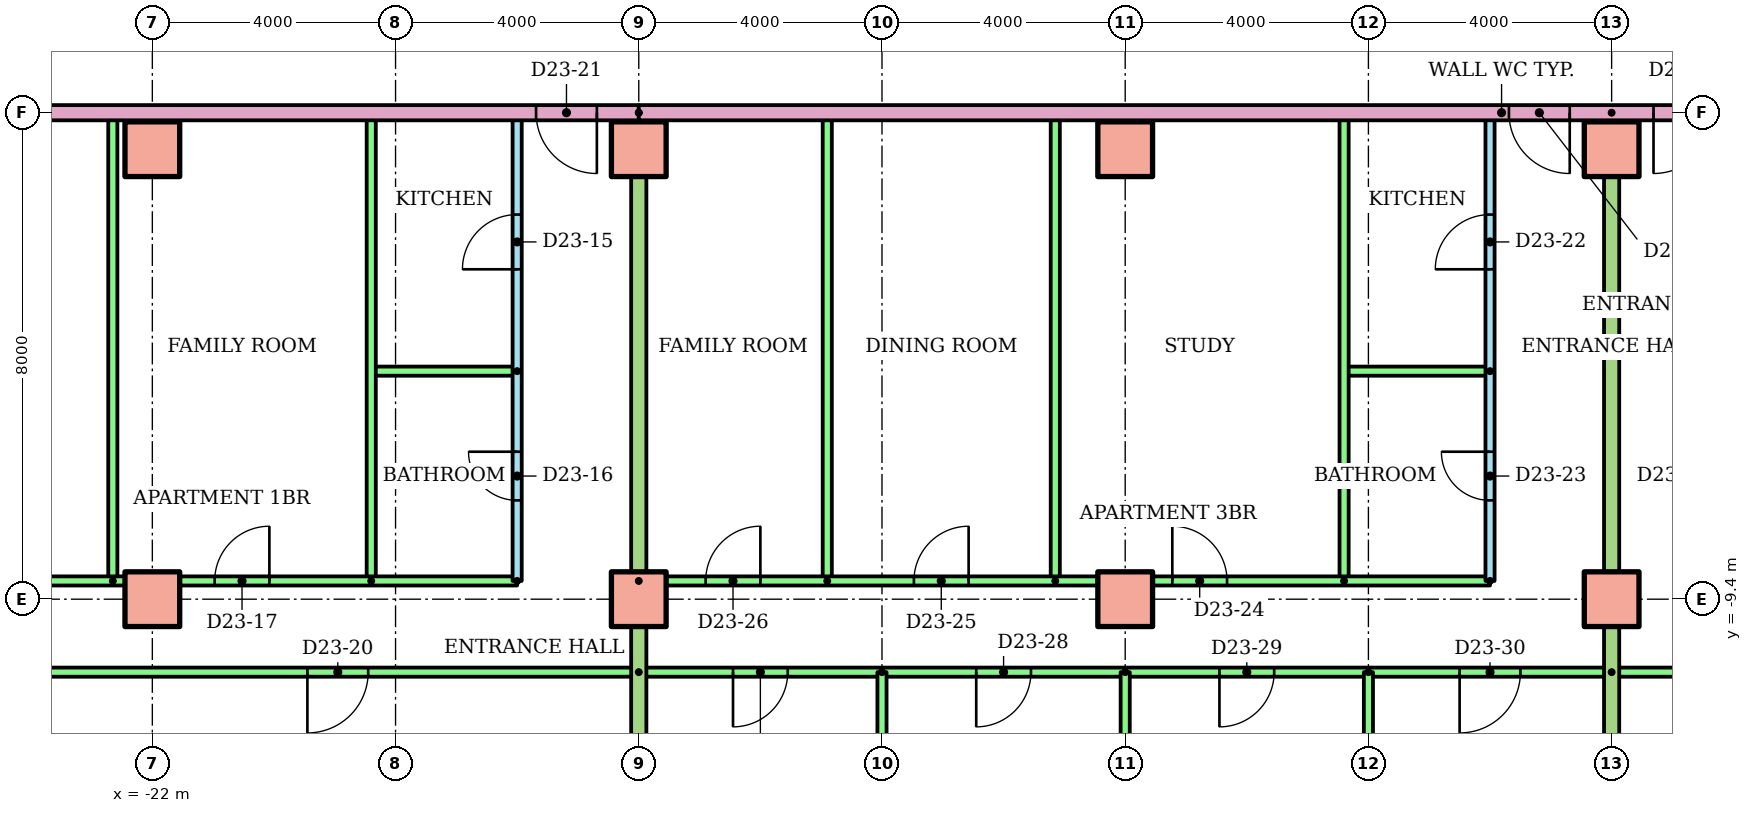
"""IFC4 building model, lengths in metres.
Left out: names, types, materials, properties, quantities, classifications, styles, units other than length and angle.
Written with IfcOpenShell. Run it as: python <this file> out.ifc"""

import sys

from ifc_helpers import new_model, si_unit, direction, frame, frame_2d, origin, origin_2d, place, context, subcontext, project, spatial, rectangle, extrude, element, fill, save


model = new_model("IFC4")
c1 = context("Model", 3, precision=1e-05, world=origin(), true_north=direction((0.0, 1.0)))
c2 = subcontext(c1, "Body", "Model", "MODEL_VIEW")
j1 = project(units=[si_unit("LENGTHUNIT", "METRE"), si_unit("PLANEANGLEUNIT", "RADIAN")], contexts=[c1])
p1 = place(None, origin())
s1 = spatial("IfcSite", under=j1, at=p1, CompositionType="ELEMENT")
p2 = place(p1, origin())
s2 = spatial("IfcBuilding", under=s1, at=p2, CompositionType="ELEMENT")
p3 = place(p2, frame((0.0, 0.0, 90.3)))
s3 = spatial("IfcBuildingStorey", under=s2, at=p3, CompositionType="ELEMENT", Elevation=90.3)
for number, where in (
    (1, (-22.0, -9.4, 0.0)),
    (2, (-14.0, -9.4, 0.0)),
    (3, (-6.0, -9.4, 0.0)),
    (4, (2.0, -9.4, 0.0)),
    (5, (-22.0, -2.0, 0.0)),
    (6, (-14.0, -2.0, 0.0)),
    (7, (-6.0, -2.0, 0.0)),
    (8, (2.0, -2.0, 0.0)),
):
    element("IfcColumn", number, at=place(p3, frame(where)), inside=s3, PredefinedType="COLUMN", context=c2, shape_type="SweptSolid", body=[
        extrude(rectangle(XDim=0.9, YDim=0.9, at=origin_2d()), origin(), (0.0, 0.0, 1.0), 3.2),
    ])
p4 = place(p3, frame((-16.0, -9.1, 0.0), z_axis=(0.0, 0.0, 1.0), x_axis=(0.0, 1.0, 0.0)))
e9 = element("IfcWall", 9, at=p4, inside=s3, PredefinedType="PARTITIONING", context=c2, shape_type="SweptSolid", body=[
    extrude(rectangle(XDim=7.7, YDim=0.15, at=frame_2d((3.85, 0.0))), origin(), (0.0, 0.0, 1.0), 2.4),
])
p5 = place(p4, frame((5.125, 0.0, 0.0)))
e10 = element("IfcOpeningElement", 10, at=p5, cuts=e9, PredefinedType="OPENING", context=c2, shape_type="SweptSolid", body=[
    extrude(rectangle(XDim=0.9, YDim=2.1, at=frame_2d((0.45, 1.05))), frame((0.0, 0.085, 0.0), z_axis=(0.0, -1.0, 0.0), x_axis=(1.0, 0.0, 0.0)), (0.0, 0.0, 1.0), 0.17),
])
p6 = place(p4, frame((1.325, 0.0, 0.0)))
e11 = element("IfcOpeningElement", 11, at=p6, cuts=e9, PredefinedType="OPENING", context=c2, shape_type="SweptSolid", body=[
    extrude(rectangle(XDim=0.8, YDim=2.1, at=frame_2d((0.4, 1.05))), frame((0.0, 0.085, 0.0), z_axis=(0.0, -1.0, 0.0), x_axis=(1.0, 0.0, 0.0)), (0.0, 0.0, 1.0), 0.17),
])
p7 = place(p3, frame((-16.0, -5.65, 0.0), z_axis=(0.0, 0.0, 1.0), x_axis=(-1.0, 0.0, 0.0)))
e12 = element("IfcWall", 12, at=p7, inside=s3, PredefinedType="PARTITIONING", context=c2, shape_type="SweptSolid", body=[
    extrude(rectangle(XDim=2.4, YDim=0.15, at=frame_2d((1.2, 0.0))), origin(), (0.0, 0.0, 1.0), 2.4),
])
for number, where, z_axis, x_axis in (
    (13, (-18.4, -9.1, 0.0), (0.0, 0.0, 1.0), (0.0, 1.0, 0.0)),
    (14, (-22.65, -9.1, 0.0), (0.0, 0.0, 1.0), (0.0, 1.0, 0.0)),
):
    element("IfcWall", number, at=place(p3, frame(where, z_axis=z_axis, x_axis=x_axis)), inside=s3, PredefinedType="PARTITIONING", context=c2, shape_type="SweptSolid", body=[
        extrude(rectangle(XDim=7.7, YDim=0.15, at=frame_2d((3.85, 0.0))), origin(), (0.0, 0.0, 1.0), 2.4),
    ])
p8 = place(p3, frame((-28.61, -9.1, 0.0)))
e15 = element("IfcWall", 15, at=p8, inside=s3, PredefinedType="PARTITIONING", context=c2, shape_type="SweptSolid", body=[
    extrude(rectangle(XDim=12.61, YDim=0.15, at=frame_2d((6.305, 0.0))), origin(), (0.0, 0.0, 1.0), 2.4),
])
p9 = place(p8, frame((7.635, 0.0, 0.0)))
e16 = element("IfcOpeningElement", 16, at=p9, cuts=e15, PredefinedType="OPENING", context=c2, shape_type="SweptSolid", body=[
    extrude(rectangle(XDim=0.9, YDim=2.1, at=frame_2d((0.45, 1.05))), frame((0.0, 0.085, 0.0), z_axis=(0.0, -1.0, 0.0), x_axis=(1.0, 0.0, 0.0)), (0.0, 0.0, 1.0), 0.17),
])
p10 = place(p8, frame((2.635, 0.0, 0.0)))
e17 = element("IfcOpeningElement", 17, at=p10, cuts=e15, PredefinedType="OPENING", context=c2, shape_type="SweptSolid", body=[
    extrude(rectangle(XDim=0.9, YDim=2.1, at=frame_2d((0.45, 1.05))), frame((0.0, 0.085, 0.0), z_axis=(0.0, -1.0, 0.0), x_axis=(1.0, 0.0, 0.0)), (0.0, 0.0, 1.0), 0.17),
])
p11 = place(p3, frame((-14.0, -10.6, 0.0), z_axis=(0.0, 0.0, 1.0), x_axis=(-1.0, 0.0, 0.0)))
e18 = element("IfcWall", 18, at=p11, inside=s3, PredefinedType="PARTITIONING", context=c2, shape_type="SweptSolid", body=[
    extrude(rectangle(XDim=14.62, YDim=0.15, at=frame_2d((7.31, 0.0))), origin(), (0.0, 0.0, 1.0), 2.4),
])
p12 = place(p11, frame((11.7, 0.0, 0.0)))
e19 = element("IfcOpeningElement", 19, at=p12, cuts=e18, PredefinedType="OPENING", context=c2, shape_type="SweptSolid", body=[
    extrude(rectangle(XDim=0.9, YDim=2.1, at=frame_2d((0.45, 1.05))), frame((0.0, 0.085, 0.0), z_axis=(0.0, -1.0, 0.0), x_axis=(1.0, 0.0, 0.0)), (0.0, 0.0, 1.0), 0.17),
])
p13 = place(p11, frame((4.45, 0.0, 0.0)))
e20 = element("IfcOpeningElement", 20, at=p13, cuts=e18, PredefinedType="OPENING", context=c2, shape_type="SweptSolid", body=[
    extrude(rectangle(XDim=1.0, YDim=2.1, at=frame_2d((0.5, 1.05))), frame((0.0, 0.085, 0.0), z_axis=(0.0, -1.0, 0.0), x_axis=(1.0, 0.0, 0.0)), (0.0, 0.0, 1.0), 0.17),
])
p14 = place(p3, frame((0.0, -9.1, 0.0), z_axis=(0.0, 0.0, 1.0), x_axis=(0.0, 1.0, 0.0)))
e21 = element("IfcWall", 21, at=p14, inside=s3, PredefinedType="PARTITIONING", context=c2, shape_type="SweptSolid", body=[
    extrude(rectangle(XDim=7.7, YDim=0.15, at=frame_2d((3.85, 0.0))), origin(), (0.0, 0.0, 1.0), 2.4),
])
p15 = place(p14, frame((5.125, 0.0, 0.0)))
e22 = element("IfcOpeningElement", 22, at=p15, cuts=e21, PredefinedType="OPENING", context=c2, shape_type="SweptSolid", body=[
    extrude(rectangle(XDim=0.9, YDim=2.1, at=frame_2d((0.45, 1.05))), frame((0.0, 0.085, 0.0), z_axis=(0.0, -1.0, 0.0), x_axis=(1.0, 0.0, 0.0)), (0.0, 0.0, 1.0), 0.17),
])
p16 = place(p14, frame((1.325, 0.0, 0.0)))
e23 = element("IfcOpeningElement", 23, at=p16, cuts=e21, PredefinedType="OPENING", context=c2, shape_type="SweptSolid", body=[
    extrude(rectangle(XDim=0.8, YDim=2.1, at=frame_2d((0.4, 1.05))), frame((0.0, 0.085, 0.0), z_axis=(0.0, -1.0, 0.0), x_axis=(1.0, 0.0, 0.0)), (0.0, 0.0, 1.0), 0.17),
])
p17 = place(p3, frame((0.0, -5.65, 0.0), z_axis=(0.0, 0.0, 1.0), x_axis=(-1.0, 0.0, 0.0)))
e24 = element("IfcWall", 24, at=p17, inside=s3, PredefinedType="PARTITIONING", context=c2, shape_type="SweptSolid", body=[
    extrude(rectangle(XDim=2.4, YDim=0.15, at=frame_2d((1.2, 0.0))), origin(), (0.0, 0.0, 1.0), 2.4),
])
for number, where, z_axis, x_axis in (
    (25, (-2.4, -9.1, 0.0), (0.0, 0.0, 1.0), (0.0, 1.0, 0.0)),
    (26, (-7.15, -9.1, 0.0), (0.0, 0.0, 1.0), (0.0, 1.0, 0.0)),
    (27, (-10.9, -9.1, 0.0), (0.0, 0.0, 1.0), (0.0, 1.0, 0.0)),
):
    element("IfcWall", number, at=place(p3, frame(where, z_axis=z_axis, x_axis=x_axis)), inside=s3, PredefinedType="PARTITIONING", context=c2, shape_type="SweptSolid", body=[
        extrude(rectangle(XDim=7.7, YDim=0.15, at=frame_2d((3.85, 0.0))), origin(), (0.0, 0.0, 1.0), 2.4),
    ])
p18 = place(p3, frame((-14.0, -9.1, 0.0)))
e28 = element("IfcWall", 28, at=p18, inside=s3, PredefinedType="PARTITIONING", context=c2, shape_type="SweptSolid", body=[
    extrude(rectangle(XDim=14.0, YDim=0.15, at=frame_2d((7.0, 0.0))), origin(), (0.0, 0.0, 1.0), 2.4),
])
p19 = place(p18, frame((8.775, 0.0, 0.0)))
e29 = element("IfcOpeningElement", 29, at=p19, cuts=e28, PredefinedType="OPENING", context=c2, shape_type="SweptSolid", body=[
    extrude(rectangle(XDim=0.9, YDim=2.1, at=frame_2d((0.45, 1.05))), frame((0.0, 0.085, 0.0), z_axis=(0.0, -1.0, 0.0), x_axis=(1.0, 0.0, 0.0)), (0.0, 0.0, 1.0), 0.17),
])
p20 = place(p18, frame((4.525, 0.0, 0.0)))
e30 = element("IfcOpeningElement", 30, at=p20, cuts=e28, PredefinedType="OPENING", context=c2, shape_type="SweptSolid", body=[
    extrude(rectangle(XDim=0.9, YDim=2.1, at=frame_2d((0.45, 1.05))), frame((0.0, 0.085, 0.0), z_axis=(0.0, -1.0, 0.0), x_axis=(1.0, 0.0, 0.0)), (0.0, 0.0, 1.0), 0.17),
])
p21 = place(p18, frame((1.1, 0.0, 0.0)))
e31 = element("IfcOpeningElement", 31, at=p21, cuts=e28, PredefinedType="OPENING", context=c2, shape_type="SweptSolid", body=[
    extrude(rectangle(XDim=0.9, YDim=2.1, at=frame_2d((0.45, 1.05))), frame((0.0, 0.085, 0.0), z_axis=(0.0, -1.0, 0.0), x_axis=(1.0, 0.0, 0.0)), (0.0, 0.0, 1.0), 0.17),
])
p22 = place(p3, frame((2.0, -10.6, 0.0), z_axis=(0.0, 0.0, 1.0), x_axis=(-1.0, 0.0, 0.0)))
e32 = element("IfcWall", 32, at=p22, inside=s3, PredefinedType="PARTITIONING", context=c2, shape_type="SweptSolid", body=[
    extrude(rectangle(XDim=16.0, YDim=0.15, at=frame_2d((8.0, 0.0))), origin(), (0.0, 0.0, 1.0), 2.4),
])
p23 = place(p22, frame((13.55, 0.0, 0.0)))
e33 = element("IfcOpeningElement", 33, at=p23, cuts=e32, PredefinedType="OPENING", context=c2, shape_type="SweptSolid", body=[
    extrude(rectangle(XDim=0.9, YDim=2.1, at=frame_2d((0.45, 1.05))), frame((0.0, 0.085, 0.0), z_axis=(0.0, -1.0, 0.0), x_axis=(1.0, 0.0, 0.0)), (0.0, 0.0, 1.0), 0.17),
])
p24 = place(p22, frame((9.55, 0.0, 0.0)))
e34 = element("IfcOpeningElement", 34, at=p24, cuts=e32, PredefinedType="OPENING", context=c2, shape_type="SweptSolid", body=[
    extrude(rectangle(XDim=0.9, YDim=2.1, at=frame_2d((0.45, 1.05))), frame((0.0, 0.085, 0.0), z_axis=(0.0, -1.0, 0.0), x_axis=(1.0, 0.0, 0.0)), (0.0, 0.0, 1.0), 0.17),
])
p25 = place(p22, frame((5.55, 0.0, 0.0)))
e35 = element("IfcOpeningElement", 35, at=p25, cuts=e32, PredefinedType="OPENING", context=c2, shape_type="SweptSolid", body=[
    extrude(rectangle(XDim=0.9, YDim=2.1, at=frame_2d((0.45, 1.05))), frame((0.0, 0.085, 0.0), z_axis=(0.0, -1.0, 0.0), x_axis=(1.0, 0.0, 0.0)), (0.0, 0.0, 1.0), 0.17),
])
p26 = place(p22, frame((1.5, 0.0, 0.0)))
e36 = element("IfcOpeningElement", 36, at=p26, cuts=e32, PredefinedType="OPENING", context=c2, shape_type="SweptSolid", body=[
    extrude(rectangle(XDim=1.0, YDim=2.1, at=frame_2d((0.5, 1.05))), frame((0.0, 0.085, 0.0), z_axis=(0.0, -1.0, 0.0), x_axis=(1.0, 0.0, 0.0)), (0.0, 0.0, 1.0), 0.17),
])
p27 = place(p3, frame((-10.0, -10.6, 0.0), z_axis=(0.0, 0.0, 1.0), x_axis=(0.0, -1.0, 0.0)))
e37 = element("IfcWall", 37, at=p27, inside=s3, PredefinedType="PARTITIONING", context=c2, shape_type="SweptSolid", body=[
    extrude(rectangle(XDim=5.621, YDim=0.15, at=frame_2d((2.811, 0.0))), origin(), (0.0, 0.0, 1.0), 2.4),
])
p28 = place(p3, frame((-6.0, -10.6, 0.0), z_axis=(0.0, 0.0, 1.0), x_axis=(0.0, -1.0, 0.0)))
e38 = element("IfcWall", 38, at=p28, inside=s3, PredefinedType="PARTITIONING", context=c2, shape_type="SweptSolid", body=[
    extrude(rectangle(XDim=5.61, YDim=0.15, at=frame_2d((2.805, 0.0))), origin(), (0.0, 0.0, 1.0), 2.4),
])
p29 = place(p3, frame((-2.0, -10.6, 0.0), z_axis=(0.0, 0.0, 1.0), x_axis=(0.0, -1.0, 0.0)))
e39 = element("IfcWall", 39, at=p29, inside=s3, PredefinedType="PARTITIONING", context=c2, shape_type="SweptSolid", body=[
    extrude(rectangle(XDim=5.621, YDim=0.15, at=frame_2d((2.811, 0.0))), origin(), (0.0, 0.0, 1.0), 2.4),
])
p30 = place(p3, frame((-14.0, -1.4, 0.0), z_axis=(0.0, 0.0, 1.0), x_axis=(0.0, -1.0, 0.0)))
e40 = element("IfcWall", 40, at=p30, inside=s3, PredefinedType="PARTITIONING", context=c2, shape_type="SweptSolid", body=[
    extrude(rectangle(XDim=14.81, YDim=0.25, at=frame_2d((7.405, 0.0))), origin(), (0.0, 0.0, 1.0), 2.4),
])
p31 = place(p3, frame((18.0, -10.6, 0.0), z_axis=(0.0, 0.0, 1.0), x_axis=(-1.0, 0.0, 0.0)))
e41 = element("IfcWall", 41, at=p31, inside=s3, PredefinedType="PARTITIONING", context=c2, shape_type="SweptSolid", body=[
    extrude(rectangle(XDim=16.0, YDim=0.15, at=frame_2d((8.0, 0.0))), origin(), (0.0, 0.0, 1.0), 2.4),
])
p32 = place(p31, frame((13.55, 0.0, 0.0)))
e42 = element("IfcOpeningElement", 42, at=p32, cuts=e41, PredefinedType="OPENING", context=c2, shape_type="SweptSolid", body=[
    extrude(rectangle(XDim=0.9, YDim=2.1, at=frame_2d((0.45, 1.05))), frame((0.0, 0.085, 0.0), z_axis=(0.0, -1.0, 0.0), x_axis=(1.0, 0.0, 0.0)), (0.0, 0.0, 1.0), 0.17),
])
p33 = place(p31, frame((9.55, 0.0, 0.0)))
e43 = element("IfcOpeningElement", 43, at=p33, cuts=e41, PredefinedType="OPENING", context=c2, shape_type="SweptSolid", body=[
    extrude(rectangle(XDim=0.9, YDim=2.1, at=frame_2d((0.45, 1.05))), frame((0.0, 0.085, 0.0), z_axis=(0.0, -1.0, 0.0), x_axis=(1.0, 0.0, 0.0)), (0.0, 0.0, 1.0), 0.17),
])
p34 = place(p31, frame((5.55, 0.0, 0.0)))
e44 = element("IfcOpeningElement", 44, at=p34, cuts=e41, PredefinedType="OPENING", context=c2, shape_type="SweptSolid", body=[
    extrude(rectangle(XDim=0.9, YDim=2.1, at=frame_2d((0.45, 1.05))), frame((0.0, 0.085, 0.0), z_axis=(0.0, -1.0, 0.0), x_axis=(1.0, 0.0, 0.0)), (0.0, 0.0, 1.0), 0.17),
])
p35 = place(p31, frame((1.5, 0.0, 0.0)))
e45 = element("IfcOpeningElement", 45, at=p35, cuts=e41, PredefinedType="OPENING", context=c2, shape_type="SweptSolid", body=[
    extrude(rectangle(XDim=1.0, YDim=2.1, at=frame_2d((0.5, 1.05))), frame((0.0, 0.085, 0.0), z_axis=(0.0, -1.0, 0.0), x_axis=(1.0, 0.0, 0.0)), (0.0, 0.0, 1.0), 0.17),
])
p36 = place(p3, frame((2.0, -1.4, 0.0), z_axis=(0.0, 0.0, 1.0), x_axis=(0.0, -1.0, 0.0)))
e46 = element("IfcWall", 46, at=p36, inside=s3, PredefinedType="PARTITIONING", context=c2, shape_type="SweptSolid", body=[
    extrude(rectangle(XDim=14.81, YDim=0.25, at=frame_2d((7.405, 0.0))), origin(), (0.0, 0.0, 1.0), 2.4),
])
p37 = place(p3, frame((-14.0, -1.4, 0.0), z_axis=(0.0, 0.0, 1.0), x_axis=(-1.0, 0.0, 0.0)))
e47 = element("IfcWall", 47, at=p37, inside=s3, PredefinedType="PARTITIONING", context=c2, shape_type="SweptSolid", body=[
    extrude(rectangle(XDim=14.62, YDim=0.25, at=frame_2d((7.31, 0.0))), origin(), (0.0, 0.0, 1.0), 2.4),
])
p38 = place(p37, frame((0.689, 0.0, 0.0)))
e48 = element("IfcOpeningElement", 48, at=p38, cuts=e47, PredefinedType="OPENING", context=c2, shape_type="SweptSolid", body=[
    extrude(rectangle(XDim=1.0, YDim=2.1, at=frame_2d((0.5, 1.05))), frame((0.0, 0.135, 0.0), z_axis=(0.0, -1.0, 0.0), x_axis=(1.0, 0.0, 0.0)), (0.0, 0.0, 1.0), 0.27),
])
p39 = place(p3, frame((14.0, -1.4, 0.0), z_axis=(0.0, 0.0, 1.0), x_axis=(-1.0, 0.0, 0.0)))
e49 = element("IfcWall", 49, at=p39, inside=s3, PredefinedType="PARTITIONING", context=c2, shape_type="SweptSolid", body=[
    extrude(rectangle(XDim=28.0, YDim=0.25, at=frame_2d((14.0, 0.0))), origin(), (0.0, 0.0, 1.0), 2.4),
])
p40 = place(p39, frame((12.689, 0.0, 0.0)))
e50 = element("IfcOpeningElement", 50, at=p40, cuts=e49, PredefinedType="OPENING", context=c2, shape_type="SweptSolid", body=[
    extrude(rectangle(XDim=1.0, YDim=2.1, at=frame_2d((0.5, 1.05))), frame((0.0, 0.135, 0.0), z_axis=(0.0, -1.0, 0.0), x_axis=(1.0, 0.0, 0.0)), (0.0, 0.0, 1.0), 0.27),
])
p41 = place(p39, frame((10.311, 0.0, 0.0)))
e51 = element("IfcOpeningElement", 51, at=p41, cuts=e49, PredefinedType="OPENING", context=c2, shape_type="SweptSolid", body=[
    extrude(rectangle(XDim=1.0, YDim=2.1, at=frame_2d((0.5, 1.05))), frame((0.0, 0.135, 0.0), z_axis=(0.0, -1.0, 0.0), x_axis=(1.0, 0.0, 0.0)), (0.0, 0.0, 1.0), 0.27),
])
p42 = place(p5, origin())
e52 = element("IfcDoor", 52, at=p42, inside=s3, OperationType="SINGLE_SWING_LEFT", PredefinedType="DOOR", context=c2, shape_type="SweptSolid", body=[
    extrude(rectangle(XDim=0.9, YDim=2.1, at=frame_2d((0.45, 1.05))), frame((0.0, 0.025, 0.0), z_axis=(0.0, -1.0, 0.0), x_axis=(1.0, 0.0, 0.0)), (0.0, 0.0, 1.0), 0.05),
])
fill(e10, e52)
p43 = place(p6, origin())
e53 = element("IfcDoor", 53, at=p43, inside=s3, OperationType="SINGLE_SWING_RIGHT", PredefinedType="DOOR", context=c2, shape_type="SweptSolid", body=[
    extrude(rectangle(XDim=0.8, YDim=2.1, at=frame_2d((0.4, 1.05))), frame((0.0, 0.025, 0.0), z_axis=(0.0, -1.0, 0.0), x_axis=(1.0, 0.0, 0.0)), (0.0, 0.0, 1.0), 0.05),
])
fill(e11, e53)
p44 = place(p9, origin())
e54 = element("IfcDoor", 54, at=p44, inside=s3, OperationType="SINGLE_SWING_RIGHT", PredefinedType="DOOR", context=c2, shape_type="SweptSolid", body=[
    extrude(rectangle(XDim=0.9, YDim=2.1, at=frame_2d((0.45, 1.05))), frame((0.0, 0.025, 0.0), z_axis=(0.0, -1.0, 0.0), x_axis=(1.0, 0.0, 0.0)), (0.0, 0.0, 1.0), 0.05),
])
fill(e16, e54)
p45 = place(p13, origin())
e55 = element("IfcDoor", 55, at=p45, inside=s3, OperationType="SINGLE_SWING_RIGHT", PredefinedType="DOOR", context=c2, shape_type="SweptSolid", body=[
    extrude(rectangle(XDim=1.0, YDim=2.1, at=frame_2d((0.5, 1.05))), frame((0.0, 0.025, 0.0), z_axis=(0.0, -1.0, 0.0), x_axis=(1.0, 0.0, 0.0)), (0.0, 0.0, 1.0), 0.05),
])
fill(e20, e55)
p46 = place(p38, origin())
e56 = element("IfcDoor", 56, at=p46, inside=s3, OperationType="SINGLE_SWING_LEFT", PredefinedType="DOOR", context=c2, shape_type="SweptSolid", body=[
    extrude(rectangle(XDim=1.0, YDim=2.1, at=frame_2d((0.5, 1.05))), frame((0.0, 0.025, 0.0), z_axis=(0.0, -1.0, 0.0), x_axis=(1.0, 0.0, 0.0)), (0.0, 0.0, 1.0), 0.05),
])
fill(e48, e56)
p47 = place(p15, origin())
e57 = element("IfcDoor", 57, at=p47, inside=s3, OperationType="SINGLE_SWING_LEFT", PredefinedType="DOOR", context=c2, shape_type="SweptSolid", body=[
    extrude(rectangle(XDim=0.9, YDim=2.1, at=frame_2d((0.45, 1.05))), frame((0.0, 0.025, 0.0), z_axis=(0.0, -1.0, 0.0), x_axis=(1.0, 0.0, 0.0)), (0.0, 0.0, 1.0), 0.05),
])
fill(e22, e57)
p48 = place(p16, origin())
e58 = element("IfcDoor", 58, at=p48, inside=s3, OperationType="SINGLE_SWING_RIGHT", PredefinedType="DOOR", context=c2, shape_type="SweptSolid", body=[
    extrude(rectangle(XDim=0.8, YDim=2.1, at=frame_2d((0.4, 1.05))), frame((0.0, 0.025, 0.0), z_axis=(0.0, -1.0, 0.0), x_axis=(1.0, 0.0, 0.0)), (0.0, 0.0, 1.0), 0.05),
])
fill(e23, e58)
p49 = place(p19, origin())
e59 = element("IfcDoor", 59, at=p49, inside=s3, OperationType="SINGLE_SWING_LEFT", PredefinedType="DOOR", context=c2, shape_type="SweptSolid", body=[
    extrude(rectangle(XDim=0.9, YDim=2.1, at=frame_2d((0.45, 1.05))), frame((0.0, 0.025, 0.0), z_axis=(0.0, -1.0, 0.0), x_axis=(1.0, 0.0, 0.0)), (0.0, 0.0, 1.0), 0.05),
])
fill(e29, e59)
p50 = place(p20, origin())
e60 = element("IfcDoor", 60, at=p50, inside=s3, OperationType="SINGLE_SWING_RIGHT", PredefinedType="DOOR", context=c2, shape_type="SweptSolid", body=[
    extrude(rectangle(XDim=0.9, YDim=2.1, at=frame_2d((0.45, 1.05))), frame((0.0, 0.025, 0.0), z_axis=(0.0, -1.0, 0.0), x_axis=(1.0, 0.0, 0.0)), (0.0, 0.0, 1.0), 0.05),
])
fill(e30, e60)
p51 = place(p21, origin())
e61 = element("IfcDoor", 61, at=p51, inside=s3, OperationType="SINGLE_SWING_RIGHT", PredefinedType="DOOR", context=c2, shape_type="SweptSolid", body=[
    extrude(rectangle(XDim=0.9, YDim=2.1, at=frame_2d((0.45, 1.05))), frame((0.0, 0.025, 0.0), z_axis=(0.0, -1.0, 0.0), x_axis=(1.0, 0.0, 0.0)), (0.0, 0.0, 1.0), 0.05),
])
fill(e31, e61)
p52 = place(p23, origin())
e62 = element("IfcDoor", 62, at=p52, inside=s3, OperationType="SINGLE_SWING_RIGHT", PredefinedType="DOOR", context=c2, shape_type="SweptSolid", body=[
    extrude(rectangle(XDim=0.9, YDim=2.1, at=frame_2d((0.45, 1.05))), frame((0.0, 0.025, 0.0), z_axis=(0.0, -1.0, 0.0), x_axis=(1.0, 0.0, 0.0)), (0.0, 0.0, 1.0), 0.05),
])
fill(e33, e62)
p53 = place(p24, origin())
e63 = element("IfcDoor", 63, at=p53, inside=s3, OperationType="SINGLE_SWING_RIGHT", PredefinedType="DOOR", context=c2, shape_type="SweptSolid", body=[
    extrude(rectangle(XDim=0.9, YDim=2.1, at=frame_2d((0.45, 1.05))), frame((0.0, 0.025, 0.0), z_axis=(0.0, -1.0, 0.0), x_axis=(1.0, 0.0, 0.0)), (0.0, 0.0, 1.0), 0.05),
])
fill(e34, e63)
p54 = place(p25, origin())
e64 = element("IfcDoor", 64, at=p54, inside=s3, OperationType="SINGLE_SWING_RIGHT", PredefinedType="DOOR", context=c2, shape_type="SweptSolid", body=[
    extrude(rectangle(XDim=0.9, YDim=2.1, at=frame_2d((0.45, 1.05))), frame((0.0, 0.025, 0.0), z_axis=(0.0, -1.0, 0.0), x_axis=(1.0, 0.0, 0.0)), (0.0, 0.0, 1.0), 0.05),
])
fill(e35, e64)
p55 = place(p26, origin())
e65 = element("IfcDoor", 65, at=p55, inside=s3, OperationType="SINGLE_SWING_RIGHT", PredefinedType="DOOR", context=c2, shape_type="SweptSolid", body=[
    extrude(rectangle(XDim=1.0, YDim=2.1, at=frame_2d((0.5, 1.05))), frame((0.0, 0.025, 0.0), z_axis=(0.0, -1.0, 0.0), x_axis=(1.0, 0.0, 0.0)), (0.0, 0.0, 1.0), 0.05),
])
fill(e36, e65)
p56 = place(p40, origin())
e66 = element("IfcDoor", 66, at=p56, inside=s3, OperationType="SINGLE_SWING_LEFT", PredefinedType="DOOR", context=c2, shape_type="SweptSolid", body=[
    extrude(rectangle(XDim=1.0, YDim=2.1, at=frame_2d((0.5, 1.05))), frame((0.0, 0.025, 0.0), z_axis=(0.0, -1.0, 0.0), x_axis=(1.0, 0.0, 0.0)), (0.0, 0.0, 1.0), 0.05),
])
fill(e50, e66)
p57 = place(p41, origin())
e67 = element("IfcDoor", 67, at=p57, inside=s3, OperationType="SINGLE_SWING_RIGHT", PredefinedType="DOOR", context=c2, shape_type="SweptSolid", body=[
    extrude(rectangle(XDim=1.0, YDim=2.1, at=frame_2d((0.5, 1.05))), frame((0.0, 0.025, 0.0), z_axis=(0.0, -1.0, 0.0), x_axis=(1.0, 0.0, 0.0)), (0.0, 0.0, 1.0), 0.05),
])
fill(e51, e67)
save(model, sys.argv[1])
